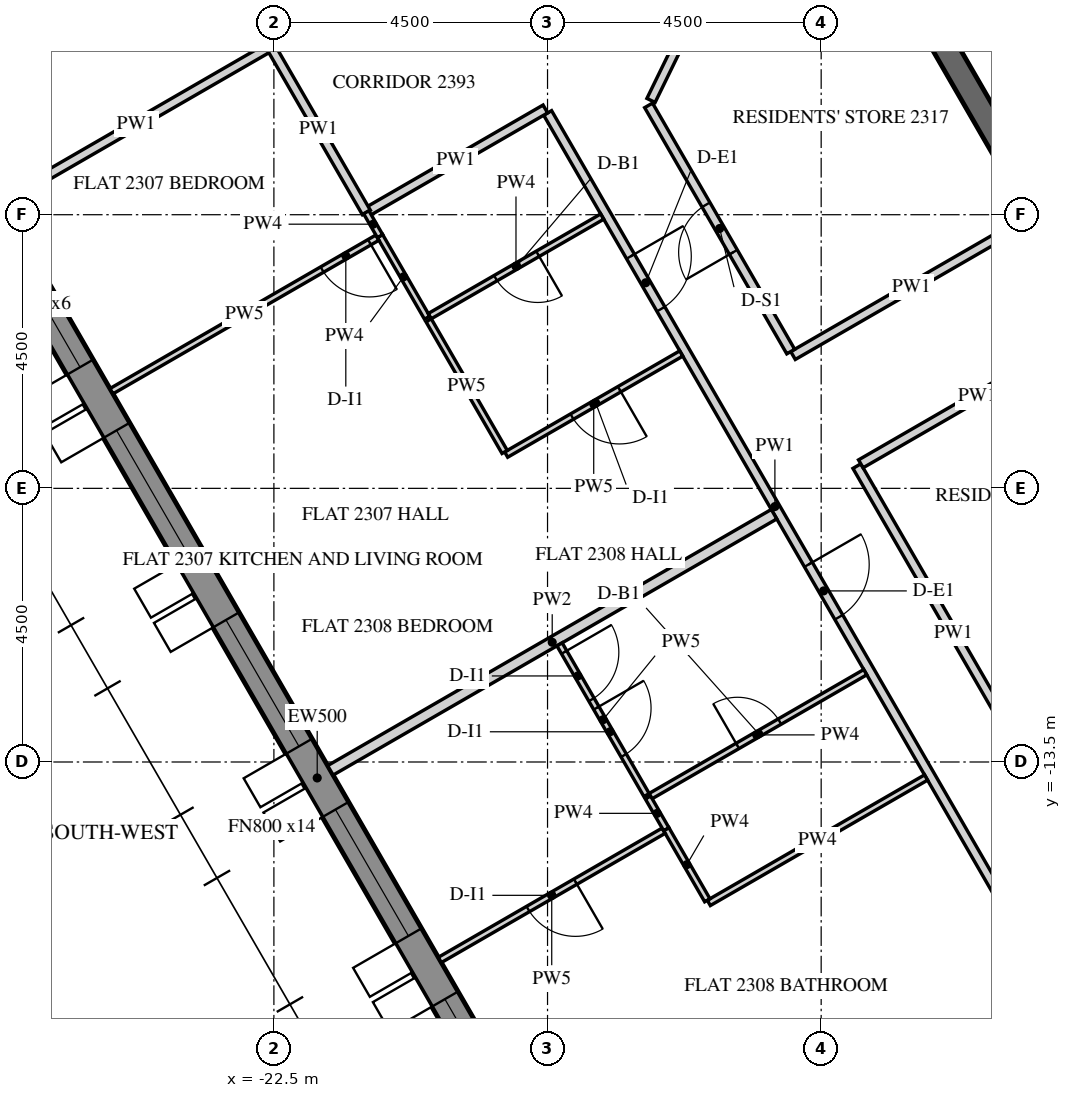
"""IFC4 building model, lengths in metres.
Left out: names, types, materials, properties, quantities, classifications, styles, units other than length and angle.
Written with IfcOpenShell. Run it as: python <this file> out.ifc"""

import sys

from ifc_helpers import new_model, si_unit, direction, frame, frame_2d, origin, place, context, subcontext, project, spatial, polyline, rectangle, outline, extrude, element, fill, save


model = new_model("IFC4")
c1 = context("Model", 3, precision=1e-05, world=origin(), true_north=direction((0.0, 1.0)))
c2 = subcontext(c1, "Body", "Model", "MODEL_VIEW")
j1 = project(units=[si_unit("LENGTHUNIT", "METRE"), si_unit("PLANEANGLEUNIT", "RADIAN")], contexts=[c1])
p1 = place(None, origin())
s1 = spatial("IfcSite", under=j1, at=p1, CompositionType="ELEMENT")
p2 = place(p1, origin())
s2 = spatial("IfcBuilding", under=s1, at=p2, CompositionType="ELEMENT")
p3 = place(p2, frame((0.0, 0.0, 291.3)))
s3 = spatial("IfcBuildingStorey", under=s2, at=p3, CompositionType="ELEMENT", Elevation=291.3)
p4 = place(p3, frame((-28.149, -2.745, -0.15), z_axis=(0.0, 0.0, 1.0), x_axis=(0.500003737743, -0.866023245787, 0.0)))
e1 = element("IfcWall", 1, at=p4, inside=s3, PredefinedType="SOLIDWALL", context=c2, shape_type="SweptSolid", body=[
    extrude(outline(polyline([(-0.021, -0.25), (25.468, -0.25), (25.421, 0.25), (0.021, 0.25), (-0.021, -0.25)])), origin(), (0.0, 0.0, 1.0), 3.9),
])
p5 = place(p4, frame((2.522, 0.0, 0.75)))
e2 = element("IfcOpeningElement", 2, at=p5, cuts=e1, PredefinedType="OPENING", context=c2, shape_type="SweptSolid", body=[
    extrude(rectangle(XDim=2.4, YDim=2.7, at=frame_2d((1.2, 1.35))), frame((0.0, 0.26, 0.0), z_axis=(0.0, -1.0, 0.0), x_axis=(1.0, 0.0, 0.0)), (0.0, 0.0, 1.0), 0.52),
])
p6 = place(p4, frame((6.122, 0.0, 0.75)))
e3 = element("IfcOpeningElement", 3, at=p6, cuts=e1, PredefinedType="OPENING", context=c2, shape_type="SweptSolid", body=[
    extrude(rectangle(XDim=2.4, YDim=2.7, at=frame_2d((1.2, 1.35))), frame((0.0, 0.26, 0.0), z_axis=(0.0, -1.0, 0.0), x_axis=(1.0, 0.0, 0.0)), (0.0, 0.0, 1.0), 0.52),
])
p7 = place(p4, frame((9.722, 0.0, 0.75)))
e4 = element("IfcOpeningElement", 4, at=p7, cuts=e1, PredefinedType="OPENING", context=c2, shape_type="SweptSolid", body=[
    extrude(rectangle(XDim=2.4, YDim=2.7, at=frame_2d((1.2, 1.35))), frame((0.0, 0.26, 0.0), z_axis=(0.0, -1.0, 0.0), x_axis=(1.0, 0.0, 0.0)), (0.0, 0.0, 1.0), 0.52),
])
p8 = place(p4, frame((13.323, 0.0, 0.75)))
e5 = element("IfcOpeningElement", 5, at=p8, cuts=e1, PredefinedType="OPENING", context=c2, shape_type="SweptSolid", body=[
    extrude(rectangle(XDim=2.4, YDim=2.7, at=frame_2d((1.2, 1.35))), frame((0.0, 0.26, 0.0), z_axis=(0.0, -1.0, 0.0), x_axis=(1.0, 0.0, 0.0)), (0.0, 0.0, 1.0), 0.52),
])
p9 = place(p4, frame((16.922, 0.0, 0.75)))
e6 = element("IfcOpeningElement", 6, at=p9, cuts=e1, PredefinedType="OPENING", context=c2, shape_type="SweptSolid", body=[
    extrude(rectangle(XDim=2.4, YDim=2.7, at=frame_2d((1.2, 1.35))), frame((0.0, 0.26, 0.0), z_axis=(0.0, -1.0, 0.0), x_axis=(1.0, 0.0, 0.0)), (0.0, 0.0, 1.0), 0.52),
])
p10 = place(p4, frame((20.522, 0.0, 0.75)))
e7 = element("IfcOpeningElement", 7, at=p10, cuts=e1, PredefinedType="OPENING", context=c2, shape_type="SweptSolid", body=[
    extrude(rectangle(XDim=2.4, YDim=2.7, at=frame_2d((1.2, 1.35))), frame((0.0, 0.26, 0.0), z_axis=(0.0, -1.0, 0.0), x_axis=(1.0, 0.0, 0.0)), (0.0, 0.0, 1.0), 0.52),
])
p11 = place(p3, frame((-12.471, 0.0, -0.15), z_axis=(0.0, 0.0, 1.0), x_axis=(0.499996419489, -0.866027470984, 0.0)))
e8 = element("IfcWall", 8, at=p11, inside=s3, PredefinedType="SHEAR", context=c2, shape_type="SweptSolid", body=[
    extrude(outline(polyline([(-0.115, -0.2), (12.586, -0.2), (12.355, 0.2), (0.115, 0.2), (-0.115, -0.2)])), origin(), (0.0, 0.0, 1.0), 3.9),
])
p12 = place(p11, frame((5.306, 0.0, 0.15)))
e9 = element("IfcOpeningElement", 9, at=p12, cuts=e8, PredefinedType="OPENING", context=c2, shape_type="SweptSolid", body=[
    extrude(rectangle(XDim=1.8, YDim=2.4, at=frame_2d((0.9, 1.2))), frame((0.0, 0.21, 0.0), z_axis=(0.0, -1.0, 0.0), x_axis=(1.0, 0.0, 0.0)), (0.0, 0.0, 1.0), 0.42),
])
p13 = place(p3, frame((-17.998, -2.826, 0.0), z_axis=(0.0, 0.0, 1.0), x_axis=(0.500003306199, -0.866023494941, 0.0)))
e10 = element("IfcWall", 10, at=p13, inside=s3, PredefinedType="PARTITIONING", context=c2, shape_type="SweptSolid", body=[
    extrude(rectangle(XDim=14.949, YDim=0.15, at=frame_2d((7.475, 0.0))), origin(), (0.0, 0.0, 1.0), 2.988),
])
p14 = place(p13, frame((2.725, 0.0, 0.0)))
e11 = element("IfcOpeningElement", 11, at=p14, cuts=e10, PredefinedType="OPENING", context=c2, shape_type="SweptSolid", body=[
    extrude(rectangle(XDim=1.0, YDim=2.1, at=frame_2d((0.5, 1.05))), frame((0.0, 0.085, 0.0), z_axis=(0.0, -1.0, 0.0), x_axis=(1.0, 0.0, 0.0)), (0.0, 0.0, 1.0), 0.17),
])
p15 = place(p13, frame((8.576, 0.0, 0.0)))
e12 = element("IfcOpeningElement", 12, at=p15, cuts=e10, PredefinedType="OPENING", context=c2, shape_type="SweptSolid", body=[
    extrude(rectangle(XDim=1.0, YDim=2.1, at=frame_2d((0.5, 1.05))), frame((0.0, 0.085, 0.0), z_axis=(0.0, -1.0, 0.0), x_axis=(1.0, 0.0, 0.0)), (0.0, 0.0, 1.0), 0.17),
])
p16 = place(p3, frame((-20.98, -4.461, 0.0), z_axis=(0.0, 0.0, 1.0), x_axis=(0.866038511948, 0.499977295307, 0.0)))
e13 = element("IfcWall", 13, at=p16, inside=s3, PredefinedType="PARTITIONING", context=c2, shape_type="SweptSolid", body=[
    extrude(rectangle(XDim=3.4, YDim=0.15, at=frame_2d((1.7, 0.0))), origin(), (0.0, 0.0, 1.0), 2.988),
])
p17 = place(p3, frame((-26.971, -4.284, 0.0), z_axis=(0.0, 0.0, 1.0), x_axis=(0.866024511559, 0.500001545377, 0.0)))
e14 = element("IfcWall", 14, at=p17, inside=s3, PredefinedType="PARTITIONING", context=c2, shape_type="SweptSolid", body=[
    extrude(rectangle(XDim=5.099, YDim=0.15, at=frame_2d((2.549, 0.0))), origin(), (0.0, 0.0, 1.0), 2.988),
])
p18 = place(p3, frame((-22.554, -1.736, 0.0), z_axis=(0.0, 0.0, 1.0), x_axis=(0.50003099832, -0.866007506156, 0.0)))
e15 = element("IfcWall", 15, at=p18, inside=s3, PredefinedType="PARTITIONING", context=c2, shape_type="SweptSolid", body=[
    extrude(rectangle(XDim=3.151, YDim=0.15, at=frame_2d((1.575, 0.0))), origin(), (0.0, 0.0, 1.0), 2.988),
])
p19 = place(p3, frame((-10.066, -4.566, 0.0), z_axis=(0.0, 0.0, 1.0), x_axis=(-0.866031096941, -0.499990139034, 0.0)))
e16 = element("IfcWall", 16, at=p19, inside=s3, PredefinedType="PARTITIONING", context=c2, shape_type="SweptSolid", body=[
    extrude(rectangle(XDim=4.5, YDim=0.15, at=frame_2d((2.25, 0.0))), origin(), (0.0, 0.0, 1.0), 2.988),
])
p20 = place(p3, frame((-14.0, -6.751, 0.0), z_axis=(0.0, 0.0, 1.0), x_axis=(-0.500008739126, 0.866020358189, 0.0)))
e17 = element("IfcWall", 17, at=p20, inside=s3, PredefinedType="PARTITIONING", context=c2, shape_type="SweptSolid", body=[
    extrude(rectangle(XDim=4.675, YDim=0.15, at=frame_2d((2.338, 0.0))), origin(), (0.0, 0.0, 1.0), 2.988),
])
p21 = place(p20, frame((1.888, 0.0, 0.0)))
e18 = element("IfcOpeningElement", 18, at=p21, cuts=e17, PredefinedType="OPENING", context=c2, shape_type="SweptSolid", body=[
    extrude(rectangle(XDim=0.9, YDim=2.1, at=frame_2d((0.45, 1.05))), frame((0.0, 0.085, 0.0), z_axis=(0.0, -1.0, 0.0), x_axis=(1.0, 0.0, 0.0)), (0.0, 0.0, 1.0), 0.17),
])
p22 = place(p3, frame((-16.298, -2.621, 0.0), z_axis=(0.0, 0.0, 1.0), x_axis=(0.438325013788, 0.898816545402, 0.0)))
e19 = element("IfcWall", 19, at=p22, inside=s3, PredefinedType="PARTITIONING", context=c2, shape_type="SweptSolid", body=[
    extrude(rectangle(XDim=1.024, YDim=0.15, at=frame_2d((0.512, 0.0))), origin(), (0.0, 0.0, 1.0), 2.988),
])
p23 = place(p3, frame((-9.735, -14.138, 0.0), z_axis=(0.0, 0.0, 1.0), x_axis=(-0.500018385592, 0.866014788598, 0.0)))
e20 = element("IfcWall", 20, at=p23, inside=s3, PredefinedType="PARTITIONING", context=c2, shape_type="SweptSolid", body=[
    extrude(rectangle(XDim=6.356, YDim=0.15, at=frame_2d((3.178, 0.0))), origin(), (0.0, 0.0, 1.0), 2.988),
])
p24 = place(p3, frame((-12.848, -8.597, 0.0), z_axis=(0.0, 0.0, 1.0), x_axis=(0.866017452598, 0.500013771606, 0.0)))
e21 = element("IfcWall", 21, at=p24, inside=s3, PredefinedType="PARTITIONING", context=c2, shape_type="SweptSolid", body=[
    extrude(rectangle(XDim=4.425, YDim=0.15, at=frame_2d((2.213, 0.0))), origin(), (0.0, 0.0, 1.0), 2.988),
])
p25 = place(p3, frame((-15.801, -6.782, 0.0), z_axis=(0.0, 0.0, 1.0), x_axis=(-0.866033959199, -0.499985181294, 0.0)))
e22 = element("IfcWall", 22, at=p25, inside=s3, PredefinedType="PARTITIONING", context=c2, shape_type="SweptSolid", body=[
    extrude(rectangle(XDim=3.325, YDim=0.1, at=frame_2d((1.662, 0.0))), origin(), (0.0, 0.0, 1.0), 2.988),
])
p26 = place(p25, frame((1.175, 0.0, 0.0)))
e23 = element("IfcOpeningElement", 23, at=p26, cuts=e22, PredefinedType="OPENING", context=c2, shape_type="SweptSolid", body=[
    extrude(rectangle(XDim=0.9, YDim=2.1, at=frame_2d((0.45, 1.05))), frame((0.0, 0.06, 0.0), z_axis=(0.0, -1.0, 0.0), x_axis=(1.0, 0.0, 0.0)), (0.0, 0.0, 1.0), 0.12),
])
p27 = place(p3, frame((-18.705, -8.402, 0.0), z_axis=(0.0, 0.0, 1.0), x_axis=(-0.500004234368, 0.866022959057, 0.0)))
e24 = element("IfcWall", 24, at=p27, inside=s3, PredefinedType="PARTITIONING", context=c2, shape_type="SweptSolid", body=[
    extrude(rectangle(XDim=2.5, YDim=0.1, at=frame_2d((1.25, 0.0))), origin(), (0.0, 0.0, 1.0), 2.988),
])
p28 = place(p3, frame((-19.98, -6.193, 0.0), z_axis=(0.0, 0.0, 1.0), x_axis=(-0.500067724834, 0.865986299303, 0.0)))
e25 = element("IfcWall", 25, at=p28, inside=s3, PredefinedType="PARTITIONING", context=c2, shape_type="SweptSolid", body=[
    extrude(rectangle(XDim=1.551, YDim=0.1, at=frame_2d((0.775, 0.0))), origin(), (0.0, 0.0, 1.0), 2.988),
])
p29 = place(p3, frame((-20.798, -4.877, 0.0), z_axis=(0.0, 0.0, 1.0), x_axis=(-0.866026981659, -0.499997267031, 0.0)))
e26 = element("IfcWall", 26, at=p29, inside=s3, PredefinedType="PARTITIONING", context=c2, shape_type="SweptSolid", body=[
    extrude(rectangle(XDim=5.05, YDim=0.1, at=frame_2d((2.525, 0.0))), origin(), (0.0, 0.0, 1.0), 2.988),
])
p30 = place(p29, frame((0.15, 0.0, 0.0)))
e27 = element("IfcOpeningElement", 27, at=p30, cuts=e26, PredefinedType="OPENING", context=c2, shape_type="SweptSolid", body=[
    extrude(rectangle(XDim=0.9, YDim=2.1, at=frame_2d((0.45, 1.05))), frame((0.0, 0.06, 0.0), z_axis=(0.0, -1.0, 0.0), x_axis=(1.0, 0.0, 0.0)), (0.0, 0.0, 1.0), 0.12),
])
p31 = place(p3, frame((-21.571, -13.637, 0.0), z_axis=(0.0, 0.0, 1.0), x_axis=(0.866034063461, 0.499985000701, 0.0)))
e28 = element("IfcWall", 28, at=p31, inside=s3, PredefinedType="PARTITIONING", context=c2, shape_type="SweptSolid", body=[
    extrude(rectangle(XDim=8.425, YDim=0.18, at=frame_2d((4.212, 0.0))), origin(), (0.0, 0.0, 1.0), 2.988),
])
p32 = place(p3, frame((-17.101, -4.531, 0.0), z_axis=(0.0, 0.0, 1.0), x_axis=(-0.866046559086, -0.499963356153, 0.0)))
e29 = element("IfcWall", 29, at=p32, inside=s3, PredefinedType="PARTITIONING", context=c2, shape_type="SweptSolid", body=[
    extrude(rectangle(XDim=3.275, YDim=0.1, at=frame_2d((1.638, 0.0))), origin(), (0.0, 0.0, 1.0), 2.988),
])
p33 = place(p32, frame((1.225, 0.0, 0.0)))
e30 = element("IfcOpeningElement", 30, at=p33, cuts=e29, PredefinedType="OPENING", context=c2, shape_type="SweptSolid", body=[
    extrude(rectangle(XDim=0.8, YDim=2.1, at=frame_2d((0.4, 1.05))), frame((0.0, 0.06, 0.0), z_axis=(0.0, -1.0, 0.0), x_axis=(1.0, 0.0, 0.0)), (0.0, 0.0, 1.0), 0.12),
])
p34 = place(p3, frame((-20.981, -4.459, 0.0), z_axis=(0.0, 0.0, 1.0), x_axis=(0.499846793097, -0.866113839764, 0.0)))
e31 = element("IfcWall", 31, at=p34, inside=s3, PredefinedType="PARTITIONING", context=c2, shape_type="SweptSolid", body=[
    extrude(rectangle(XDim=0.453, YDim=0.1, at=frame_2d((0.227, 0.0))), origin(), (0.0, 0.0, 1.0), 2.988),
])
p35 = place(p3, frame((-11.775, -13.755, 0.0), z_axis=(0.0, 0.0, 1.0), x_axis=(-0.866034795751, -0.499983732284, 0.0)))
e32 = element("IfcWall", 32, at=p35, inside=s3, PredefinedType="PARTITIONING", context=c2, shape_type="SweptSolid", body=[
    extrude(rectangle(XDim=4.125, YDim=0.1, at=frame_2d((2.062, 0.0))), origin(), (0.0, 0.0, 1.0), 2.988),
])
p36 = place(p3, frame((-15.372, -15.774, 0.0), z_axis=(0.0, 0.0, 1.0), x_axis=(-0.500003806764, 0.866023205937, 0.0)))
e33 = element("IfcWall", 33, at=p36, inside=s3, PredefinedType="PARTITIONING", context=c2, shape_type="SweptSolid", body=[
    extrude(rectangle(XDim=1.352, YDim=0.1, at=frame_2d((0.676, 0.0))), origin(), (0.0, 0.0, 1.0), 2.988),
])
p37 = place(p3, frame((-16.091, -14.63, 0.0), z_axis=(0.0, 0.0, 1.0), x_axis=(-0.866028703517, -0.499994284652, 0.0)))
e34 = element("IfcWall", 34, at=p37, inside=s3, PredefinedType="PARTITIONING", context=c2, shape_type="SweptSolid", body=[
    extrude(rectangle(XDim=4.25, YDim=0.1, at=frame_2d((2.125, 0.0))), origin(), (0.0, 0.0, 1.0), 2.988),
])
p38 = place(p37, frame((1.675, 0.0, 0.0)))
e35 = element("IfcOpeningElement", 35, at=p38, cuts=e34, PredefinedType="OPENING", context=c2, shape_type="SweptSolid", body=[
    extrude(rectangle(XDim=0.9, YDim=2.1, at=frame_2d((0.45, 1.05))), frame((0.0, 0.06, 0.0), z_axis=(0.0, -1.0, 0.0), x_axis=(1.0, 0.0, 0.0)), (0.0, 0.0, 1.0), 0.12),
])
p39 = place(p3, frame((-16.347, -14.085, 0.0), z_axis=(0.0, 0.0, 1.0), x_axis=(0.866034795751, 0.499983732284, 0.0)))
e36 = element("IfcWall", 36, at=p39, inside=s3, PredefinedType="PARTITIONING", context=c2, shape_type="SweptSolid", body=[
    extrude(rectangle(XDim=4.125, YDim=0.1, at=frame_2d((2.062, 0.0))), origin(), (0.0, 0.0, 1.0), 2.988),
])
p40 = place(p39, frame((1.7, 0.0, 0.0)))
e37 = element("IfcOpeningElement", 37, at=p40, cuts=e36, PredefinedType="OPENING", context=c2, shape_type="SweptSolid", body=[
    extrude(rectangle(XDim=0.8, YDim=2.1, at=frame_2d((0.4, 1.05))), frame((0.0, 0.06, 0.0), z_axis=(0.0, -1.0, 0.0), x_axis=(1.0, 0.0, 0.0)), (0.0, 0.0, 1.0), 0.12),
])
p41 = place(p3, frame((-17.802, -11.565, 0.0), z_axis=(0.0, 0.0, 1.0), x_axis=(0.499983369373, -0.866035005268, 0.0)))
e38 = element("IfcWall", 38, at=p41, inside=s3, PredefinedType="PARTITIONING", context=c2, shape_type="SweptSolid", body=[
    extrude(rectangle(XDim=2.862, YDim=0.1, at=frame_2d((1.431, 0.0))), origin(), (0.0, 0.0, 1.0), 2.988),
])
p42 = place(p41, frame((0.15, 0.0, 0.0)))
e39 = element("IfcOpeningElement", 39, at=p42, cuts=e38, PredefinedType="OPENING", context=c2, shape_type="SweptSolid", body=[
    extrude(rectangle(XDim=0.9, YDim=2.1, at=frame_2d((0.45, 1.05))), frame((0.0, 0.06, 0.0), z_axis=(0.0, -1.0, 0.0), x_axis=(1.0, 0.0, 0.0)), (0.0, 0.0, 1.0), 0.12),
])
p43 = place(p41, frame((1.21, 0.0, 0.0)))
e40 = element("IfcOpeningElement", 40, at=p43, cuts=e38, PredefinedType="OPENING", context=c2, shape_type="SweptSolid", body=[
    extrude(rectangle(XDim=0.9, YDim=2.1, at=frame_2d((0.45, 1.05))), frame((0.0, 0.06, 0.0), z_axis=(0.0, -1.0, 0.0), x_axis=(1.0, 0.0, 0.0)), (0.0, 0.0, 1.0), 0.12),
])
p44 = place(p3, frame((-16.348, -14.084, 0.0), z_axis=(0.0, 0.0, 1.0), x_axis=(0.499933044277, -0.866064057238, 0.0)))
e41 = element("IfcWall", 41, at=p44, inside=s3, PredefinedType="PARTITIONING", context=c2, shape_type="SweptSolid", body=[
    extrude(rectangle(XDim=0.602, YDim=0.1, at=frame_2d((0.301, 0.0))), origin(), (0.0, 0.0, 1.0), 2.988),
])
p45 = place(p5, frame((0.0, 0.18, 0.0)))
e42 = element("IfcWindow", 42, at=p45, inside=s3, PartitioningType="DOUBLE_PANEL_VERTICAL", PredefinedType="WINDOW", context=c2, shape_type="SweptSolid", body=[
    extrude(rectangle(XDim=2.4, YDim=2.7, at=frame_2d((1.2, 1.35))), frame((0.0, 0.03, 0.0), z_axis=(0.0, -1.0, 0.0), x_axis=(1.0, 0.0, 0.0)), (0.0, 0.0, 1.0), 0.06),
])
fill(e2, e42)
p46 = place(p6, frame((0.0, 0.18, 0.0)))
e43 = element("IfcWindow", 43, at=p46, inside=s3, PartitioningType="DOUBLE_PANEL_VERTICAL", PredefinedType="WINDOW", context=c2, shape_type="SweptSolid", body=[
    extrude(rectangle(XDim=2.4, YDim=2.7, at=frame_2d((1.2, 1.35))), frame((0.0, 0.03, 0.0), z_axis=(0.0, -1.0, 0.0), x_axis=(1.0, 0.0, 0.0)), (0.0, 0.0, 1.0), 0.06),
])
fill(e3, e43)
p47 = place(p7, frame((0.0, 0.18, 0.0)))
e44 = element("IfcWindow", 44, at=p47, inside=s3, PartitioningType="DOUBLE_PANEL_VERTICAL", PredefinedType="WINDOW", context=c2, shape_type="SweptSolid", body=[
    extrude(rectangle(XDim=2.4, YDim=2.7, at=frame_2d((1.2, 1.35))), frame((0.0, 0.03, 0.0), z_axis=(0.0, -1.0, 0.0), x_axis=(1.0, 0.0, 0.0)), (0.0, 0.0, 1.0), 0.06),
])
fill(e4, e44)
p48 = place(p8, frame((0.0, 0.18, 0.0)))
e45 = element("IfcWindow", 45, at=p48, inside=s3, PartitioningType="DOUBLE_PANEL_VERTICAL", PredefinedType="WINDOW", context=c2, shape_type="SweptSolid", body=[
    extrude(rectangle(XDim=2.4, YDim=2.7, at=frame_2d((1.2, 1.35))), frame((0.0, 0.03, 0.0), z_axis=(0.0, -1.0, 0.0), x_axis=(1.0, 0.0, 0.0)), (0.0, 0.0, 1.0), 0.06),
])
fill(e5, e45)
p49 = place(p9, frame((0.0, 0.18, 0.0)))
e46 = element("IfcWindow", 46, at=p49, inside=s3, PartitioningType="DOUBLE_PANEL_VERTICAL", PredefinedType="WINDOW", context=c2, shape_type="SweptSolid", body=[
    extrude(rectangle(XDim=2.4, YDim=2.7, at=frame_2d((1.2, 1.35))), frame((0.0, 0.03, 0.0), z_axis=(0.0, -1.0, 0.0), x_axis=(1.0, 0.0, 0.0)), (0.0, 0.0, 1.0), 0.06),
])
fill(e6, e46)
p50 = place(p14, origin())
e47 = element("IfcDoor", 47, at=p50, inside=s3, OperationType="SINGLE_SWING_RIGHT", PredefinedType="DOOR", context=c2, shape_type="SweptSolid", body=[
    extrude(rectangle(XDim=1.0, YDim=2.1, at=frame_2d((0.5, 1.05))), frame((0.0, 0.025, 0.0), z_axis=(0.0, -1.0, 0.0), x_axis=(1.0, 0.0, 0.0)), (0.0, 0.0, 1.0), 0.05),
])
fill(e11, e47)
p51 = place(p33, origin())
e48 = element("IfcDoor", 48, at=p51, inside=s3, OperationType="SINGLE_SWING_RIGHT", PredefinedType="DOOR", context=c2, shape_type="SweptSolid", body=[
    extrude(rectangle(XDim=0.8, YDim=2.1, at=frame_2d((0.4, 1.05))), frame((0.0, 0.025, 0.0), z_axis=(0.0, -1.0, 0.0), x_axis=(1.0, 0.0, 0.0)), (0.0, 0.0, 1.0), 0.05),
])
fill(e30, e48)
p52 = place(p26, origin())
e49 = element("IfcDoor", 49, at=p52, inside=s3, OperationType="SINGLE_SWING_RIGHT", PredefinedType="DOOR", context=c2, shape_type="SweptSolid", body=[
    extrude(rectangle(XDim=0.9, YDim=2.1, at=frame_2d((0.45, 1.05))), frame((0.0, 0.025, 0.0), z_axis=(0.0, -1.0, 0.0), x_axis=(1.0, 0.0, 0.0)), (0.0, 0.0, 1.0), 0.05),
])
fill(e23, e49)
p53 = place(p30, origin())
e50 = element("IfcDoor", 50, at=p53, inside=s3, OperationType="SINGLE_SWING_RIGHT", PredefinedType="DOOR", context=c2, shape_type="SweptSolid", body=[
    extrude(rectangle(XDim=0.9, YDim=2.1, at=frame_2d((0.45, 1.05))), frame((0.0, 0.025, 0.0), z_axis=(0.0, -1.0, 0.0), x_axis=(1.0, 0.0, 0.0)), (0.0, 0.0, 1.0), 0.05),
])
fill(e27, e50)
p54 = place(p15, origin())
e51 = element("IfcDoor", 51, at=p54, inside=s3, OperationType="SINGLE_SWING_RIGHT", PredefinedType="DOOR", context=c2, shape_type="SweptSolid", body=[
    extrude(rectangle(XDim=1.0, YDim=2.1, at=frame_2d((0.5, 1.05))), frame((0.0, 0.025, 0.0), z_axis=(0.0, -1.0, 0.0), x_axis=(1.0, 0.0, 0.0)), (0.0, 0.0, 1.0), 0.05),
])
fill(e12, e51)
p55 = place(p40, origin())
e52 = element("IfcDoor", 52, at=p55, inside=s3, OperationType="SINGLE_SWING_LEFT", PredefinedType="DOOR", context=c2, shape_type="SweptSolid", body=[
    extrude(rectangle(XDim=0.8, YDim=2.1, at=frame_2d((0.4, 1.05))), frame((0.0, 0.025, 0.0), z_axis=(0.0, -1.0, 0.0), x_axis=(1.0, 0.0, 0.0)), (0.0, 0.0, 1.0), 0.05),
])
fill(e37, e52)
p56 = place(p42, origin())
e53 = element("IfcDoor", 53, at=p56, inside=s3, OperationType="SINGLE_SWING_LEFT", PredefinedType="DOOR", context=c2, shape_type="SweptSolid", body=[
    extrude(rectangle(XDim=0.9, YDim=2.1, at=frame_2d((0.45, 1.05))), frame((0.0, 0.025, 0.0), z_axis=(0.0, -1.0, 0.0), x_axis=(1.0, 0.0, 0.0)), (0.0, 0.0, 1.0), 0.05),
])
fill(e39, e53)
p57 = place(p43, origin())
e54 = element("IfcDoor", 54, at=p57, inside=s3, OperationType="SINGLE_SWING_LEFT", PredefinedType="DOOR", context=c2, shape_type="SweptSolid", body=[
    extrude(rectangle(XDim=0.9, YDim=2.1, at=frame_2d((0.45, 1.05))), frame((0.0, 0.025, 0.0), z_axis=(0.0, -1.0, 0.0), x_axis=(1.0, 0.0, 0.0)), (0.0, 0.0, 1.0), 0.05),
])
fill(e40, e54)
p58 = place(p38, origin())
e55 = element("IfcDoor", 55, at=p58, inside=s3, OperationType="SINGLE_SWING_LEFT", PredefinedType="DOOR", context=c2, shape_type="SweptSolid", body=[
    extrude(rectangle(XDim=0.9, YDim=2.1, at=frame_2d((0.45, 1.05))), frame((0.0, 0.025, 0.0), z_axis=(0.0, -1.0, 0.0), x_axis=(1.0, 0.0, 0.0)), (0.0, 0.0, 1.0), 0.05),
])
fill(e35, e55)
p59 = place(p21, origin())
e56 = element("IfcDoor", 56, at=p59, inside=s3, OperationType="SINGLE_SWING_RIGHT", PredefinedType="DOOR", context=c2, shape_type="SweptSolid", body=[
    extrude(rectangle(XDim=0.9, YDim=2.1, at=frame_2d((0.45, 1.05))), frame((0.0, 0.025, 0.0), z_axis=(0.0, -1.0, 0.0), x_axis=(1.0, 0.0, 0.0)), (0.0, 0.0, 1.0), 0.05),
])
fill(e18, e56)
save(model, sys.argv[1])
